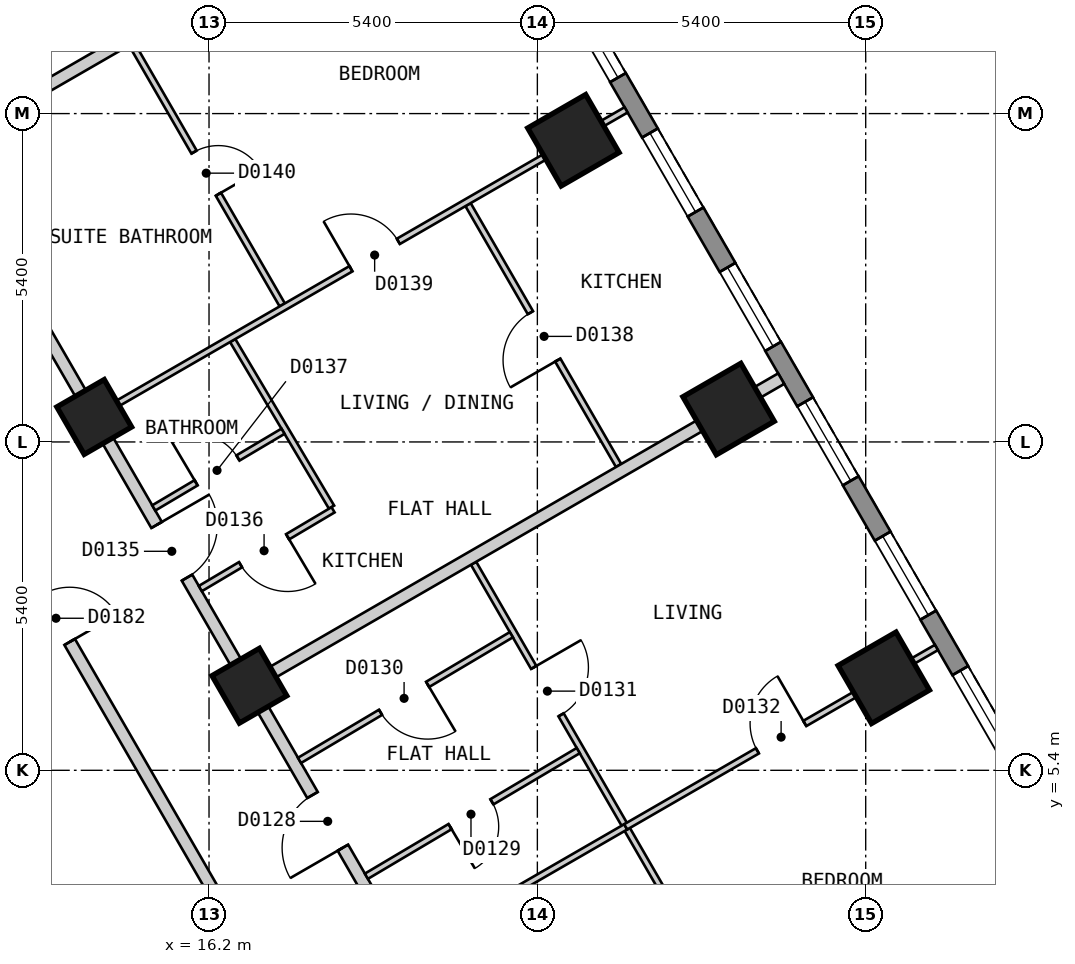
"""IFC4 building model, lengths in metres.
Left out: names, types, materials, properties, quantities, classifications, styles, units other than length and angle.
Written with IfcOpenShell. Run it as: python <this file> out.ifc"""

import sys

from ifc_helpers import new_model, si_unit, direction, frame, frame_2d, origin, origin_2d, place, context, subcontext, project, spatial, polyline, rectangle, outline, extrude, element, fill, save


model = new_model("IFC4")
c1 = context("Model", 3, precision=1e-05, world=origin(), true_north=direction((0.0, 1.0)))
c2 = subcontext(c1, "Body", "Model", "MODEL_VIEW")
j1 = project(units=[si_unit("LENGTHUNIT", "METRE"), si_unit("PLANEANGLEUNIT", "RADIAN")], contexts=[c1])
p1 = place(None, origin())
s1 = spatial("IfcSite", under=j1, at=p1, CompositionType="ELEMENT")
p2 = place(p1, origin())
s2 = spatial("IfcBuilding", under=s1, at=p2, CompositionType="ELEMENT")
p3 = place(p2, frame((0.0, 0.0, 23.4)))
s3 = spatial("IfcBuildingStorey", under=s2, at=p3, CompositionType="ELEMENT", Elevation=23.4)
for number, where, z_axis, x_axis in (
    (1, (27.297, 6.921, 0.0), (0.0, 0.0, 1.0), (-0.5, 0.866, 0.0)),
    (2, (24.745, 11.341, 0.0), (0.0, 0.0, 1.0), (-0.5, 0.866, 0.0)),
    (3, (22.193, 15.761, 0.0), (0.0, 0.0, 1.0), (-0.5, 0.866, 0.0)),
):
    element("IfcColumn", number, at=place(p3, frame(where, z_axis=z_axis, x_axis=x_axis)), inside=s3, PredefinedType="COLUMN", context=c2, shape_type="SweptSolid", body=[
        extrude(rectangle(XDim=1.1, YDim=1.1, at=origin_2d()), origin(), (0.0, 0.0, 1.0), 3.0),
    ])
for number, where, z_axis, x_axis in (
    (4, (16.864, 6.791, 0.0), (0.0, 0.0, 1.0), (-0.5, 0.866, 0.0)),
    (5, (14.312, 11.211, 0.0), (0.0, 0.0, 1.0), (-0.5, 0.866, 0.0)),
):
    element("IfcColumn", number, at=place(p3, frame(where, z_axis=z_axis, x_axis=x_axis)), inside=s3, PredefinedType="COLUMN", context=c2, shape_type="SweptSolid", body=[
        extrude(rectangle(XDim=0.9, YDim=0.9, at=origin_2d()), origin(), (0.0, 0.0, 1.0), 3.0),
    ])
p4 = place(p3, frame((31.22, 2.425, 0.0), z_axis=(0.0, 0.0, 1.0), x_axis=(-0.500001938803, 0.866024284413, 0.0)))
e6 = element("IfcWall", 6, at=p4, inside=s3, PredefinedType="SOLIDWALL", context=c2, shape_type="SweptSolid", body=[
    extrude(outline(polyline([(0.0, -0.15), (27.02, -0.15), (26.94, 0.15), (0.08, 0.15), (0.0, -0.15)])), origin(), (0.0, 0.0, 1.0), 2.7),
])
p5 = place(p4, frame((1.277, 0.0, 0.15)))
e7 = element("IfcOpeningElement", 7, at=p5, cuts=e6, PredefinedType="OPENING", context=c2, shape_type="SweptSolid", body=[
    extrude(rectangle(XDim=1.5, YDim=2.1, at=frame_2d((0.75, 1.05))), frame((0.0, 0.16, 0.0), z_axis=(0.0, -1.0, 0.0), x_axis=(1.0, 0.0, 0.0)), (0.0, 0.0, 1.0), 0.32),
])
p6 = place(p4, frame((3.829, 0.0, 0.15)))
e8 = element("IfcOpeningElement", 8, at=p6, cuts=e6, PredefinedType="OPENING", context=c2, shape_type="SweptSolid", body=[
    extrude(rectangle(XDim=1.5, YDim=2.1, at=frame_2d((0.75, 1.05))), frame((0.0, 0.16, 0.0), z_axis=(0.0, -1.0, 0.0), x_axis=(1.0, 0.0, 0.0)), (0.0, 0.0, 1.0), 0.32),
])
p7 = place(p4, frame((6.382, 0.0, 0.15)))
e9 = element("IfcOpeningElement", 9, at=p7, cuts=e6, PredefinedType="OPENING", context=c2, shape_type="SweptSolid", body=[
    extrude(rectangle(XDim=1.5, YDim=2.1, at=frame_2d((0.75, 1.05))), frame((0.0, 0.16, 0.0), z_axis=(0.0, -1.0, 0.0), x_axis=(1.0, 0.0, 0.0)), (0.0, 0.0, 1.0), 0.32),
])
p8 = place(p4, frame((8.933, 0.0, 0.15)))
e10 = element("IfcOpeningElement", 10, at=p8, cuts=e6, PredefinedType="OPENING", context=c2, shape_type="SweptSolid", body=[
    extrude(rectangle(XDim=1.5, YDim=2.1, at=frame_2d((0.75, 1.05))), frame((0.0, 0.16, 0.0), z_axis=(0.0, -1.0, 0.0), x_axis=(1.0, 0.0, 0.0)), (0.0, 0.0, 1.0), 0.32),
])
p9 = place(p4, frame((11.485, 0.0, 0.15)))
e11 = element("IfcOpeningElement", 11, at=p9, cuts=e6, PredefinedType="OPENING", context=c2, shape_type="SweptSolid", body=[
    extrude(rectangle(XDim=1.5, YDim=2.1, at=frame_2d((0.75, 1.05))), frame((0.0, 0.16, 0.0), z_axis=(0.0, -1.0, 0.0), x_axis=(1.0, 0.0, 0.0)), (0.0, 0.0, 1.0), 0.32),
])
p10 = place(p4, frame((14.037, 0.0, 0.15)))
e12 = element("IfcOpeningElement", 12, at=p10, cuts=e6, PredefinedType="OPENING", context=c2, shape_type="SweptSolid", body=[
    extrude(rectangle(XDim=1.5, YDim=2.1, at=frame_2d((0.75, 1.05))), frame((0.0, 0.16, 0.0), z_axis=(0.0, -1.0, 0.0), x_axis=(1.0, 0.0, 0.0)), (0.0, 0.0, 1.0), 0.32),
])
p11 = place(p4, frame((16.589, 0.0, 0.15)))
e13 = element("IfcOpeningElement", 13, at=p11, cuts=e6, PredefinedType="OPENING", context=c2, shape_type="SweptSolid", body=[
    extrude(rectangle(XDim=1.5, YDim=2.1, at=frame_2d((0.75, 1.05))), frame((0.0, 0.16, 0.0), z_axis=(0.0, -1.0, 0.0), x_axis=(1.0, 0.0, 0.0)), (0.0, 0.0, 1.0), 0.32),
])
p12 = place(p4, frame((19.141, 0.0, 0.15)))
e14 = element("IfcOpeningElement", 14, at=p12, cuts=e6, PredefinedType="OPENING", context=c2, shape_type="SweptSolid", body=[
    extrude(rectangle(XDim=1.5, YDim=2.1, at=frame_2d((0.75, 1.05))), frame((0.0, 0.16, 0.0), z_axis=(0.0, -1.0, 0.0), x_axis=(1.0, 0.0, 0.0)), (0.0, 0.0, 1.0), 0.32),
])
p13 = place(p4, frame((21.693, 0.0, 0.15)))
e15 = element("IfcOpeningElement", 15, at=p13, cuts=e6, PredefinedType="OPENING", context=c2, shape_type="SweptSolid", body=[
    extrude(rectangle(XDim=1.5, YDim=2.1, at=frame_2d((0.75, 1.05))), frame((0.0, 0.16, 0.0), z_axis=(0.0, -1.0, 0.0), x_axis=(1.0, 0.0, 0.0)), (0.0, 0.0, 1.0), 0.32),
])
p14 = place(p4, frame((24.244, 0.0, 0.15)))
e16 = element("IfcOpeningElement", 16, at=p14, cuts=e6, PredefinedType="OPENING", context=c2, shape_type="SweptSolid", body=[
    extrude(rectangle(XDim=1.5, YDim=2.1, at=frame_2d((0.75, 1.05))), frame((0.0, 0.16, 0.0), z_axis=(0.0, -1.0, 0.0), x_axis=(1.0, 0.0, 0.0)), (0.0, 0.0, 1.0), 0.32),
])
p15 = place(p3, frame((9.18, 15.7, 0.0), z_axis=(0.0, 0.0, 1.0), x_axis=(0.500003652032, -0.866023295272, 0.0)))
e17 = element("IfcWall", 17, at=p15, inside=s3, PredefinedType="PARTITIONING", context=c2, shape_type="SweptSolid", body=[
    extrude(rectangle(XDim=18.012, YDim=0.2, at=frame_2d((9.006, 0.0))), origin(), (0.0, 0.0, 1.0), 2.7),
])
p16 = place(p15, frame((8.556, 0.0, 0.0)))
e18 = element("IfcOpeningElement", 18, at=p16, cuts=e17, PredefinedType="OPENING", context=c2, shape_type="SweptSolid", body=[
    extrude(rectangle(XDim=0.9, YDim=2.1, at=frame_2d((0.45, 1.05))), frame((0.0, 0.11, 0.0), z_axis=(0.0, -1.0, 0.0), x_axis=(1.0, 0.0, 0.0)), (0.0, 0.0, 1.0), 0.22),
])
p17 = place(p3, frame((10.45, 17.9, 0.0), z_axis=(0.0, 0.0, 1.0), x_axis=(0.500034352617, -0.866005569383, 0.0)))
e19 = element("IfcWall", 19, at=p17, inside=s3, PredefinedType="PARTITIONING", context=c2, shape_type="SweptSolid", body=[
    extrude(rectangle(XDim=20.553, YDim=0.2, at=frame_2d((10.276, 0.0))), origin(), (0.0, 0.0, 1.0), 2.7),
])
p18 = place(p17, frame((14.903, 0.0, 0.0)))
e20 = element("IfcOpeningElement", 20, at=p18, cuts=e19, PredefinedType="OPENING", context=c2, shape_type="SweptSolid", body=[
    extrude(rectangle(XDim=1.0, YDim=2.1, at=frame_2d((0.5, 1.05))), frame((0.0, 0.11, 0.0), z_axis=(0.0, -1.0, 0.0), x_axis=(1.0, 0.0, 0.0)), (0.0, 0.0, 1.0), 0.22),
])
p19 = place(p17, frame((9.775, 0.0, 0.0)))
e21 = element("IfcOpeningElement", 21, at=p19, cuts=e19, PredefinedType="OPENING", context=c2, shape_type="SweptSolid", body=[
    extrude(rectangle(XDim=1.0, YDim=2.1, at=frame_2d((0.5, 1.05))), frame((0.0, 0.11, 0.0), z_axis=(0.0, -1.0, 0.0), x_axis=(1.0, 0.0, 0.0)), (0.0, 0.0, 1.0), 0.22),
])
p20 = place(p3, frame((16.589, 12.468, 0.0), z_axis=(0.0, 0.0, 1.0), x_axis=(0.510331599186, -0.859977708358, 0.0)))
e22 = element("IfcWall", 22, at=p20, inside=s3, PredefinedType="PARTITIONING", context=c2, shape_type="SweptSolid", body=[
    extrude(rectangle(XDim=3.186, YDim=0.1, at=frame_2d((1.593, 0.0))), origin(), (0.0, 0.0, 1.0), 2.7),
])
p21 = place(p3, frame((14.928, 17.344, 0.0), z_axis=(0.0, 0.0, 1.0), x_axis=(0.499881743012, -0.866093668724, 0.0)))
e23 = element("IfcWall", 23, at=p21, inside=s3, PredefinedType="PARTITIONING", context=c2, shape_type="SweptSolid", body=[
    extrude(rectangle(XDim=4.953, YDim=0.1, at=frame_2d((2.477, 0.0))), origin(), (0.0, 0.0, 1.0), 2.7),
])
p22 = place(p21, frame((2.052, 0.0, 0.0)))
e24 = element("IfcOpeningElement", 24, at=p22, cuts=e23, PredefinedType="OPENING", context=c2, shape_type="SweptSolid", body=[
    extrude(rectangle(XDim=0.8, YDim=2.1, at=frame_2d((0.4, 1.05))), frame((0.0, 0.06, 0.0), z_axis=(0.0, -1.0, 0.0), x_axis=(1.0, 0.0, 0.0)), (0.0, 0.0, 1.0), 0.12),
])
p23 = place(p3, frame((20.551, 8.805, 0.0), z_axis=(0.0, 0.0, 1.0), x_axis=(0.499984387913, -0.86603441724, 0.0)))
e25 = element("IfcWall", 25, at=p23, inside=s3, PredefinedType="PARTITIONING", context=c2, shape_type="SweptSolid", body=[
    extrude(rectangle(XDim=10.058, YDim=0.1, at=frame_2d((5.029, 0.0))), origin(), (0.0, 0.0, 1.0), 2.7),
])
p24 = place(p23, frame((1.978, 0.0, 0.0)))
e26 = element("IfcOpeningElement", 26, at=p24, cuts=e25, PredefinedType="OPENING", context=c2, shape_type="SweptSolid", body=[
    extrude(rectangle(XDim=0.9, YDim=2.1, at=frame_2d((0.45, 1.05))), frame((0.0, 0.06, 0.0), z_axis=(0.0, -1.0, 0.0), x_axis=(1.0, 0.0, 0.0)), (0.0, 0.0, 1.0), 0.12),
])
p25 = place(p23, frame((7.157, 0.0, 0.0)))
e27 = element("IfcOpeningElement", 27, at=p25, cuts=e25, PredefinedType="OPENING", context=c2, shape_type="SweptSolid", body=[
    extrude(rectangle(XDim=0.8, YDim=2.1, at=frame_2d((0.4, 1.05))), frame((0.0, 0.06, 0.0), z_axis=(0.0, -1.0, 0.0), x_axis=(1.0, 0.0, 0.0)), (0.0, 0.0, 1.0), 0.12),
])
p26 = place(p3, frame((20.46, 14.703, 0.0), z_axis=(0.0, 0.0, 1.0), x_axis=(0.499903082856, -0.866081351693, 0.0)))
e28 = element("IfcWall", 28, at=p26, inside=s3, PredefinedType="PARTITIONING", context=c2, shape_type="SweptSolid", body=[
    extrude(rectangle(XDim=4.953, YDim=0.1, at=frame_2d((2.477, 0.0))), origin(), (0.0, 0.0, 1.0), 2.7),
])
p27 = place(p26, frame((2.052, 0.0, 0.0)))
e29 = element("IfcOpeningElement", 29, at=p27, cuts=e28, PredefinedType="OPENING", context=c2, shape_type="SweptSolid", body=[
    extrude(rectangle(XDim=0.9, YDim=2.1, at=frame_2d((0.45, 1.05))), frame((0.0, 0.06, 0.0), z_axis=(0.0, -1.0, 0.0), x_axis=(1.0, 0.0, 0.0)), (0.0, 0.0, 1.0), 0.12),
])
p28 = place(p3, frame((19.503, 2.421, 0.0), z_axis=(0.0, 0.0, 1.0), x_axis=(0.866083434238, 0.499899474834, 0.0)))
e30 = element("IfcWall", 30, at=p28, inside=s3, PredefinedType="PARTITIONING", context=c2, shape_type="SweptSolid", body=[
    extrude(rectangle(XDim=4.099, YDim=0.1, at=frame_2d((2.049, 0.0))), origin(), (0.0, 0.0, 1.0), 2.7),
])
p29 = place(p3, frame((14.399, 11.261, 0.0), z_axis=(0.0, 0.0, 1.0), x_axis=(0.866022959057, 0.500004234368, 0.0)))
e31 = element("IfcWall", 31, at=p29, inside=s3, PredefinedType="PARTITIONING", context=c2, shape_type="SweptSolid", body=[
    extrude(rectangle(XDim=10.0, YDim=0.1, at=frame_2d((5.0, 0.0))), origin(), (0.0, 0.0, 1.0), 2.7),
])
p30 = place(p29, frame((4.775, 0.0, 0.0)))
e32 = element("IfcOpeningElement", 32, at=p30, cuts=e31, PredefinedType="OPENING", context=c2, shape_type="SweptSolid", body=[
    extrude(rectangle(XDim=0.9, YDim=2.1, at=frame_2d((0.45, 1.05))), frame((0.0, 0.06, 0.0), z_axis=(0.0, -1.0, 0.0), x_axis=(1.0, 0.0, 0.0)), (0.0, 0.0, 1.0), 0.12),
])
p31 = place(p3, frame((17.688, 5.563, 0.0), z_axis=(0.0, 0.0, 1.0), x_axis=(0.860050619918, 0.510208713351, 0.0)))
e33 = element("IfcWall", 33, at=p31, inside=s3, PredefinedType="PARTITIONING", context=c2, shape_type="SweptSolid", body=[
    extrude(rectangle(XDim=4.051, YDim=0.1, at=frame_2d((2.025, 0.0))), origin(), (0.0, 0.0, 1.0), 2.7),
])
p32 = place(p31, frame((1.55, 0.0, 0.0)))
e34 = element("IfcOpeningElement", 34, at=p32, cuts=e33, PredefinedType="OPENING", context=c2, shape_type="SweptSolid", body=[
    extrude(rectangle(XDim=0.9, YDim=2.1, at=frame_2d((0.45, 1.05))), frame((0.0, 0.06, 0.0), z_axis=(0.0, -1.0, 0.0), x_axis=(1.0, 0.0, 0.0)), (0.0, 0.0, 1.0), 0.12),
])
p33 = place(p3, frame((18.788, 3.658, 0.0), z_axis=(0.0, 0.0, 1.0), x_axis=(0.860114269096, 0.510101405701, 0.0)))
e35 = element("IfcWall", 35, at=p33, inside=s3, PredefinedType="PARTITIONING", context=c2, shape_type="SweptSolid", body=[
    extrude(rectangle(XDim=4.051, YDim=0.1, at=frame_2d((2.025, 0.0))), origin(), (0.0, 0.0, 1.0), 2.7),
])
p34 = place(p33, frame((1.6, 0.0, 0.0)))
e36 = element("IfcOpeningElement", 36, at=p34, cuts=e35, PredefinedType="OPENING", context=c2, shape_type="SweptSolid", body=[
    extrude(rectangle(XDim=0.8, YDim=2.1, at=frame_2d((0.4, 1.05))), frame((0.0, 0.06, 0.0), z_axis=(0.0, -1.0, 0.0), x_axis=(1.0, 0.0, 0.0)), (0.0, 0.0, 1.0), 0.12),
])
p35 = place(p3, frame((16.057, 8.389, 0.0), z_axis=(0.0, 0.0, 1.0), x_axis=(0.860036770423, 0.510232058499, 0.0)))
e37 = element("IfcWall", 37, at=p35, inside=s3, PredefinedType="PARTITIONING", context=c2, shape_type="SweptSolid", body=[
    extrude(rectangle(XDim=2.538, YDim=0.1, at=frame_2d((1.269, 0.0))), origin(), (0.0, 0.0, 1.0), 2.7),
])
p36 = place(p35, frame((0.769, 0.0, 0.0)))
e38 = element("IfcOpeningElement", 38, at=p36, cuts=e37, PredefinedType="OPENING", context=c2, shape_type="SweptSolid", body=[
    extrude(rectangle(XDim=0.9, YDim=2.1, at=frame_2d((0.45, 1.05))), frame((0.0, 0.06, 0.0), z_axis=(0.0, -1.0, 0.0), x_axis=(1.0, 0.0, 0.0)), (0.0, 0.0, 1.0), 0.12),
])
p37 = place(p3, frame((15.291, 9.715, 0.0), z_axis=(0.0, 0.0, 1.0), x_axis=(0.860087708271, 0.510146188932, 0.0)))
e39 = element("IfcWall", 39, at=p37, inside=s3, PredefinedType="PARTITIONING", context=c2, shape_type="SweptSolid", body=[
    extrude(rectangle(XDim=2.472, YDim=0.1, at=frame_2d((1.236, 0.0))), origin(), (0.0, 0.0, 1.0), 2.7),
])
p38 = place(p37, frame((0.81, 0.0, 0.0)))
e40 = element("IfcOpeningElement", 40, at=p38, cuts=e39, PredefinedType="OPENING", context=c2, shape_type="SweptSolid", body=[
    extrude(rectangle(XDim=0.8, YDim=2.1, at=frame_2d((0.4, 1.05))), frame((0.0, 0.06, 0.0), z_axis=(0.0, -1.0, 0.0), x_axis=(1.0, 0.0, 0.0)), (0.0, 0.0, 1.0), 0.12),
])
for number, where, z_axis, x_axis in (
    (41, (16.95, 6.841, 0.0), (0.0, 0.0, 1.0), (0.866, 0.5, 0.0)),
    (42, (11.847, 15.681, 0.0), (0.0, 0.0, 1.0), (0.866, 0.5, 0.0)),
):
    element("IfcWall", number, at=place(p3, frame(where, z_axis=z_axis, x_axis=x_axis)), inside=s3, PredefinedType="PARTITIONING", context=c2, shape_type="SweptSolid", body=[
        extrude(rectangle(XDim=10.0, YDim=0.2, at=frame_2d((5.0, 0.0))), origin(), (0.0, 0.0, 1.0), 2.7),
    ])
p39 = place(p3, frame((23.053, 4.47, 0.0), z_axis=(0.0, 0.0, 1.0), x_axis=(0.866052608538, 0.499952877023, 0.0)))
e43 = element("IfcWall", 43, at=p39, inside=s3, PredefinedType="PARTITIONING", context=c2, shape_type="SweptSolid", body=[
    extrude(rectangle(XDim=5.9, YDim=0.1, at=frame_2d((2.95, 0.0))), origin(), (0.0, 0.0, 1.0), 2.7),
])
p40 = place(p39, frame((2.501, 0.0, 0.0)))
e44 = element("IfcOpeningElement", 44, at=p40, cuts=e43, PredefinedType="OPENING", context=c2, shape_type="SweptSolid", body=[
    extrude(rectangle(XDim=0.9, YDim=2.1, at=frame_2d((0.45, 1.05))), frame((0.0, 0.06, 0.0), z_axis=(0.0, -1.0, 0.0), x_axis=(1.0, 0.0, 0.0)), (0.0, 0.0, 1.0), 0.12),
])
p41 = place(p6, origin())
e45 = element("IfcWindow", 45, at=p41, inside=s3, PartitioningType="SINGLE_PANEL", PredefinedType="WINDOW", context=c2, shape_type="SweptSolid", body=[
    extrude(rectangle(XDim=1.5, YDim=2.1, at=frame_2d((0.75, 1.05))), frame((0.0, 0.03, 0.0), z_axis=(0.0, -1.0, 0.0), x_axis=(1.0, 0.0, 0.0)), (0.0, 0.0, 1.0), 0.06),
])
fill(e8, e45)
p42 = place(p7, origin())
e46 = element("IfcWindow", 46, at=p42, inside=s3, PartitioningType="SINGLE_PANEL", PredefinedType="WINDOW", context=c2, shape_type="SweptSolid", body=[
    extrude(rectangle(XDim=1.5, YDim=2.1, at=frame_2d((0.75, 1.05))), frame((0.0, 0.03, 0.0), z_axis=(0.0, -1.0, 0.0), x_axis=(1.0, 0.0, 0.0)), (0.0, 0.0, 1.0), 0.06),
])
fill(e9, e46)
p43 = place(p8, origin())
e47 = element("IfcWindow", 47, at=p43, inside=s3, PartitioningType="SINGLE_PANEL", PredefinedType="WINDOW", context=c2, shape_type="SweptSolid", body=[
    extrude(rectangle(XDim=1.5, YDim=2.1, at=frame_2d((0.75, 1.05))), frame((0.0, 0.03, 0.0), z_axis=(0.0, -1.0, 0.0), x_axis=(1.0, 0.0, 0.0)), (0.0, 0.0, 1.0), 0.06),
])
fill(e10, e47)
p44 = place(p9, origin())
e48 = element("IfcWindow", 48, at=p44, inside=s3, PartitioningType="SINGLE_PANEL", PredefinedType="WINDOW", context=c2, shape_type="SweptSolid", body=[
    extrude(rectangle(XDim=1.5, YDim=2.1, at=frame_2d((0.75, 1.05))), frame((0.0, 0.03, 0.0), z_axis=(0.0, -1.0, 0.0), x_axis=(1.0, 0.0, 0.0)), (0.0, 0.0, 1.0), 0.06),
])
fill(e11, e48)
p45 = place(p10, origin())
e49 = element("IfcWindow", 49, at=p45, inside=s3, PartitioningType="SINGLE_PANEL", PredefinedType="WINDOW", context=c2, shape_type="SweptSolid", body=[
    extrude(rectangle(XDim=1.5, YDim=2.1, at=frame_2d((0.75, 1.05))), frame((0.0, 0.03, 0.0), z_axis=(0.0, -1.0, 0.0), x_axis=(1.0, 0.0, 0.0)), (0.0, 0.0, 1.0), 0.06),
])
fill(e12, e49)
p46 = place(p11, origin())
e50 = element("IfcWindow", 50, at=p46, inside=s3, PartitioningType="SINGLE_PANEL", PredefinedType="WINDOW", context=c2, shape_type="SweptSolid", body=[
    extrude(rectangle(XDim=1.5, YDim=2.1, at=frame_2d((0.75, 1.05))), frame((0.0, 0.03, 0.0), z_axis=(0.0, -1.0, 0.0), x_axis=(1.0, 0.0, 0.0)), (0.0, 0.0, 1.0), 0.06),
])
fill(e13, e50)
p47 = place(p18, origin())
e51 = element("IfcDoor", 51, at=p47, inside=s3, OperationType="SINGLE_SWING_RIGHT", PredefinedType="DOOR", context=c2, shape_type="SweptSolid", body=[
    extrude(rectangle(XDim=1.0, YDim=2.1, at=frame_2d((0.5, 1.05))), frame((0.0, 0.025, 0.0), z_axis=(0.0, -1.0, 0.0), x_axis=(1.0, 0.0, 0.0)), (0.0, 0.0, 1.0), 0.05),
])
fill(e20, e51)
p48 = place(p34, origin())
e52 = element("IfcDoor", 52, at=p48, inside=s3, OperationType="SINGLE_SWING_LEFT", PredefinedType="DOOR", context=c2, shape_type="SweptSolid", body=[
    extrude(rectangle(XDim=0.8, YDim=2.1, at=frame_2d((0.4, 1.05))), frame((0.0, 0.025, 0.0), z_axis=(0.0, -1.0, 0.0), x_axis=(1.0, 0.0, 0.0)), (0.0, 0.0, 1.0), 0.05),
])
fill(e36, e52)
p49 = place(p32, origin())
e53 = element("IfcDoor", 53, at=p49, inside=s3, OperationType="SINGLE_SWING_RIGHT", PredefinedType="DOOR", context=c2, shape_type="SweptSolid", body=[
    extrude(rectangle(XDim=0.9, YDim=2.1, at=frame_2d((0.45, 1.05))), frame((0.0, 0.025, 0.0), z_axis=(0.0, -1.0, 0.0), x_axis=(1.0, 0.0, 0.0)), (0.0, 0.0, 1.0), 0.05),
])
fill(e34, e53)
p50 = place(p24, origin())
e54 = element("IfcDoor", 54, at=p50, inside=s3, OperationType="SINGLE_SWING_LEFT", PredefinedType="DOOR", context=c2, shape_type="SweptSolid", body=[
    extrude(rectangle(XDim=0.9, YDim=2.1, at=frame_2d((0.45, 1.05))), frame((0.0, 0.025, 0.0), z_axis=(0.0, -1.0, 0.0), x_axis=(1.0, 0.0, 0.0)), (0.0, 0.0, 1.0), 0.05),
])
fill(e26, e54)
p51 = place(p40, origin())
e55 = element("IfcDoor", 55, at=p51, inside=s3, OperationType="SINGLE_SWING_RIGHT", PredefinedType="DOOR", context=c2, shape_type="SweptSolid", body=[
    extrude(rectangle(XDim=0.9, YDim=2.1, at=frame_2d((0.45, 1.05))), frame((0.0, 0.025, 0.0), z_axis=(0.0, -1.0, 0.0), x_axis=(1.0, 0.0, 0.0)), (0.0, 0.0, 1.0), 0.05),
])
fill(e44, e55)
p52 = place(p19, origin())
e56 = element("IfcDoor", 56, at=p52, inside=s3, OperationType="SINGLE_SWING_LEFT", PredefinedType="DOOR", context=c2, shape_type="SweptSolid", body=[
    extrude(rectangle(XDim=1.0, YDim=2.1, at=frame_2d((0.5, 1.05))), frame((0.0, 0.025, 0.0), z_axis=(0.0, -1.0, 0.0), x_axis=(1.0, 0.0, 0.0)), (0.0, 0.0, 1.0), 0.05),
])
fill(e21, e56)
p53 = place(p36, origin())
e57 = element("IfcDoor", 57, at=p53, inside=s3, OperationType="SINGLE_SWING_RIGHT", PredefinedType="DOOR", context=c2, shape_type="SweptSolid", body=[
    extrude(rectangle(XDim=0.9, YDim=2.1, at=frame_2d((0.45, 1.05))), frame((0.0, 0.025, 0.0), z_axis=(0.0, -1.0, 0.0), x_axis=(1.0, 0.0, 0.0)), (0.0, 0.0, 1.0), 0.05),
])
fill(e38, e57)
p54 = place(p38, origin())
e58 = element("IfcDoor", 58, at=p54, inside=s3, OperationType="SINGLE_SWING_LEFT", PredefinedType="DOOR", context=c2, shape_type="SweptSolid", body=[
    extrude(rectangle(XDim=0.8, YDim=2.1, at=frame_2d((0.4, 1.05))), frame((0.0, 0.025, 0.0), z_axis=(0.0, -1.0, 0.0), x_axis=(1.0, 0.0, 0.0)), (0.0, 0.0, 1.0), 0.05),
])
fill(e40, e58)
p55 = place(p27, origin())
e59 = element("IfcDoor", 59, at=p55, inside=s3, OperationType="SINGLE_SWING_RIGHT", PredefinedType="DOOR", context=c2, shape_type="SweptSolid", body=[
    extrude(rectangle(XDim=0.9, YDim=2.1, at=frame_2d((0.45, 1.05))), frame((0.0, 0.025, 0.0), z_axis=(0.0, -1.0, 0.0), x_axis=(1.0, 0.0, 0.0)), (0.0, 0.0, 1.0), 0.05),
])
fill(e29, e59)
p56 = place(p30, origin())
e60 = element("IfcDoor", 60, at=p56, inside=s3, OperationType="SINGLE_SWING_LEFT", PredefinedType="DOOR", context=c2, shape_type="SweptSolid", body=[
    extrude(rectangle(XDim=0.9, YDim=2.1, at=frame_2d((0.45, 1.05))), frame((0.0, 0.025, 0.0), z_axis=(0.0, -1.0, 0.0), x_axis=(1.0, 0.0, 0.0)), (0.0, 0.0, 1.0), 0.05),
])
fill(e32, e60)
p57 = place(p22, origin())
e61 = element("IfcDoor", 61, at=p57, inside=s3, OperationType="SINGLE_SWING_RIGHT", PredefinedType="DOOR", context=c2, shape_type="SweptSolid", body=[
    extrude(rectangle(XDim=0.8, YDim=2.1, at=frame_2d((0.4, 1.05))), frame((0.0, 0.025, 0.0), z_axis=(0.0, -1.0, 0.0), x_axis=(1.0, 0.0, 0.0)), (0.0, 0.0, 1.0), 0.05),
])
fill(e24, e61)
p58 = place(p16, origin())
e62 = element("IfcDoor", 62, at=p58, inside=s3, OperationType="SINGLE_SWING_RIGHT", PredefinedType="DOOR", context=c2, shape_type="SweptSolid", body=[
    extrude(rectangle(XDim=0.9, YDim=2.1, at=frame_2d((0.45, 1.05))), frame((0.0, 0.025, 0.0), z_axis=(0.0, -1.0, 0.0), x_axis=(1.0, 0.0, 0.0)), (0.0, 0.0, 1.0), 0.05),
])
fill(e18, e62)
save(model, sys.argv[1])
